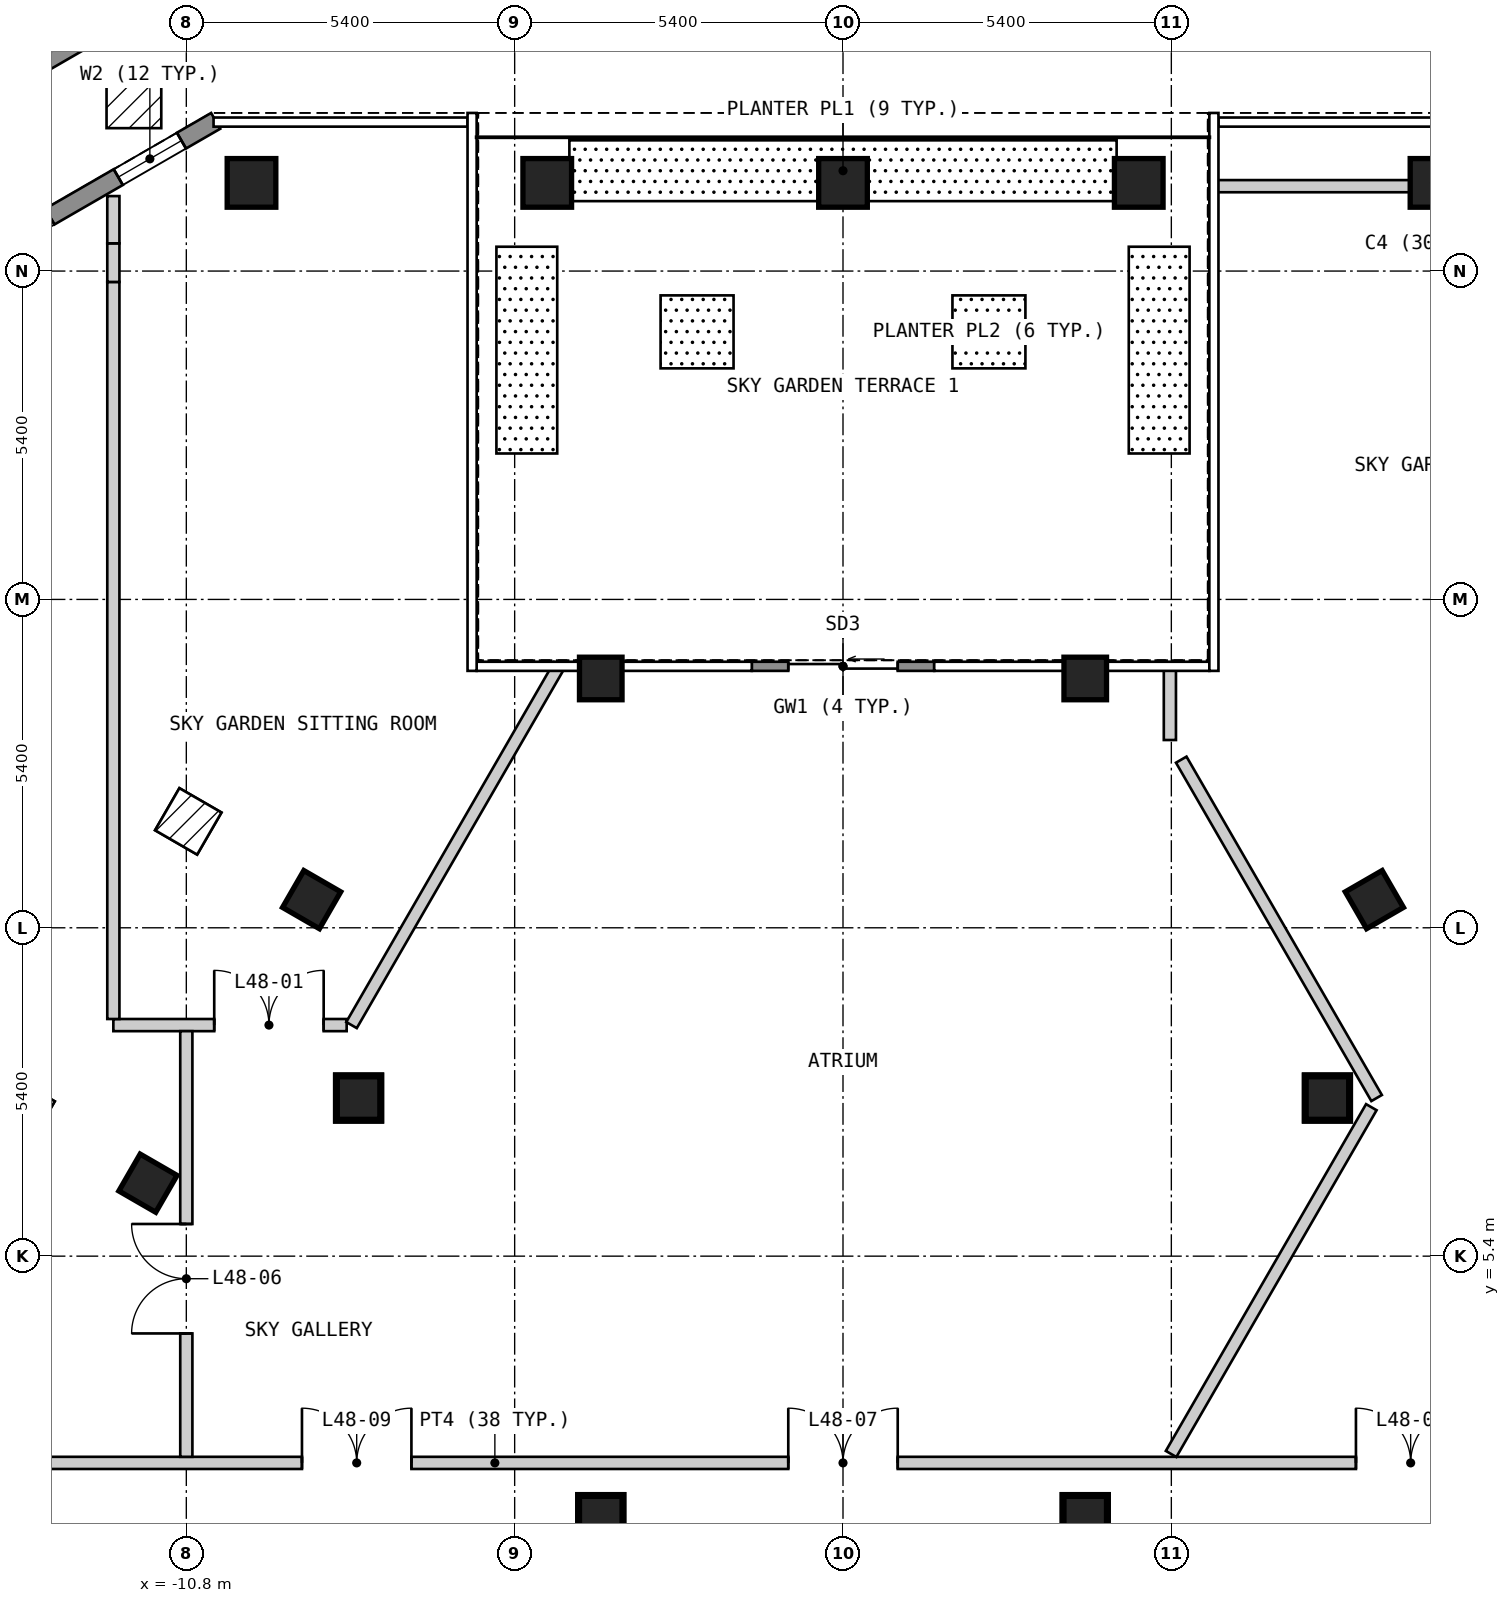
"""IFC4 building model, lengths in metres.
Left out: names, types, materials, properties, quantities, classifications, styles, units other than length and angle.
Written with IfcOpenShell. Run it as: python <this file> out.ifc"""

import sys

from ifc_helpers import new_model, si_unit, direction, frame, frame_2d, origin, origin_2d, place, context, subcontext, project, spatial, polyline, rectangle, outline, extrude, element, fill, save


model = new_model("IFC4")
c1 = context("Model", 3, precision=1e-05, world=origin(), true_north=direction((0.0, 1.0)))
c2 = subcontext(c1, "Body", "Model", "MODEL_VIEW")
j1 = project(units=[si_unit("LENGTHUNIT", "METRE"), si_unit("PLANEANGLEUNIT", "RADIAN")], contexts=[c1])
p1 = place(None, origin())
s1 = spatial("IfcSite", under=j1, at=p1, CompositionType="ELEMENT")
p2 = place(p1, origin())
s2 = spatial("IfcBuilding", under=s1, at=p2, CompositionType="ELEMENT")
p3 = place(p2, frame((0.0, 0.0, 157.2)))
s3 = spatial("IfcBuildingStorey", under=s2, at=p3, CompositionType="ELEMENT", Elevation=157.2)
for number, where, z_axis, x_axis in (
    (1, (9.728, 23.05, 0.0), (0.0, 0.0, 1.0), (-1.0, 0.0, 0.0)),
    (2, (4.864, 23.05, 0.0), (0.0, 0.0, 1.0), (-1.0, 0.0, 0.0)),
    (3, (0.0, 23.05, 0.0), (0.0, 0.0, 1.0), (-1.0, 0.0, 0.0)),
    (4, (-4.864, 23.05, 0.0), (0.0, 0.0, 1.0), (-1.0, 0.0, 0.0)),
    (5, (-9.728, 23.05, 0.0), (0.0, 0.0, 1.0), (-1.0, 0.0, 0.0)),
):
    element("IfcColumn", number, at=place(p3, frame(where, z_axis=z_axis, x_axis=x_axis)), inside=s3, PredefinedType="COLUMN", context=c2, shape_type="SweptSolid", body=[
        extrude(rectangle(XDim=0.8, YDim=0.8, at=origin_2d()), origin(), (0.0, 0.0, 1.0), 6.0),
    ])
for number, where, z_axis, x_axis in (
    (6, (3.984, 1.1, 0.0), (0.0, 0.0, 1.0), (1.0, 0.0, 0.0)),
    (7, (7.967, 8.0, 0.0), (0.0, 0.0, 1.0), (1.0, 0.0, 0.0)),
    (8, (8.739, 11.263, 0.0), (0.0, 0.0, 1.0), (-0.5, 0.866, 0.0)),
    (9, (3.984, 14.9, 0.0), (0.0, 0.0, 1.0), (1.0, 0.0, 0.0)),
    (10, (-3.984, 14.9, 0.0), (0.0, 0.0, 1.0), (1.0, 0.0, 0.0)),
    (11, (-8.739, 11.263, 0.0), (0.0, 0.0, 1.0), (-0.5, -0.866, 0.0)),
    (12, (-7.967, 8.0, 0.0), (0.0, 0.0, 1.0), (1.0, 0.0, 0.0)),
    (13, (-11.431, 6.6, 0.0), (0.0, 0.0, 1.0), (-0.5, -0.866, 0.0)),
    (14, (-3.984, 1.1, 0.0), (0.0, 0.0, 1.0), (1.0, 0.0, 0.0)),
):
    element("IfcColumn", number, at=place(p3, frame(where, z_axis=z_axis, x_axis=x_axis)), inside=s3, PredefinedType="COLUMN", context=c2, shape_type="SweptSolid", body=[
        extrude(rectangle(XDim=0.7, YDim=0.7, at=origin_2d()), origin(), (0.0, 0.0, 1.0), 6.0),
    ])
p4 = place(p3, frame((-10.317, 24.07, 0.0), z_axis=(0.0, 0.0, 1.0), x_axis=(-0.866022959057, -0.500004234368, 0.0)))
e15 = element("IfcWall", 15, at=p4, inside=s3, PredefinedType="SOLIDWALL", context=c2, shape_type="SweptSolid", body=[
    extrude(outline(polyline([(0.0, -0.15), (5.0, -0.15), (4.92, 0.15), (0.08, 0.15), (0.0, -0.15)])), origin(), (0.0, 0.0, 1.0), 5.7),
])
p5 = place(p4, frame((0.65, 0.0, 0.15)))
e16 = element("IfcOpeningElement", 16, at=p5, cuts=e15, PredefinedType="OPENING", context=c2, shape_type="SweptSolid", body=[
    extrude(rectangle(XDim=1.2, YDim=2.1, at=frame_2d((0.6, 1.05))), frame((0.0, 0.16, 0.0), z_axis=(0.0, -1.0, 0.0), x_axis=(1.0, 0.0, 0.0)), (0.0, 0.0, 1.0), 0.32),
])
p6 = place(p4, frame((3.149, 0.0, 0.15)))
e17 = element("IfcOpeningElement", 17, at=p6, cuts=e15, PredefinedType="OPENING", context=c2, shape_type="SweptSolid", body=[
    extrude(rectangle(XDim=1.2, YDim=2.1, at=frame_2d((0.6, 1.05))), frame((0.0, 0.16, 0.0), z_axis=(0.0, -1.0, 0.0), x_axis=(1.0, 0.0, 0.0)), (0.0, 0.0, 1.0), 0.32),
])
p7 = place(p3, frame((1.5, 15.1, 0.0), z_axis=(0.0, 0.0, 1.0), x_axis=(-1.0, 0.0, 0.0)))
e18 = element("IfcWall", 18, at=p7, inside=s3, PredefinedType="SOLIDWALL", context=c2, shape_type="SweptSolid", body=[
    extrude(rectangle(XDim=3.0, YDim=0.15, at=frame_2d((1.5, 0.0))), origin(), (0.0, 0.0, 1.0), 5.7),
])
p8 = place(p7, frame((0.6, 0.0, 0.0)))
e19 = element("IfcOpeningElement", 19, at=p8, cuts=e18, PredefinedType="OPENING", context=c2, shape_type="SweptSolid", body=[
    extrude(rectangle(XDim=1.8, YDim=2.4, at=frame_2d((0.9, 1.2))), frame((0.0, 0.085, 0.0), z_axis=(0.0, -1.0, 0.0), x_axis=(1.0, 0.0, 0.0)), (0.0, 0.0, 1.0), 0.17),
])
p9 = place(p3, frame((-16.622, 22.991, 0.0), z_axis=(0.0, 0.0, 1.0), x_axis=(0.865889515344, 0.500235291855, 0.0)))
e20 = element("IfcWall", 20, at=p9, inside=s3, PredefinedType="PARAPET", context=c2, shape_type="SweptSolid", body=[
    extrude(outline(polyline([(0.067, -0.125), (4.933, -0.125), (5.0, 0.125), (0.0, 0.125), (0.067, -0.125)])), origin(), (0.0, 0.0, 1.0), 1.6),
])
p10 = place(p3, frame((-24.451, 2.0, 0.0), z_axis=(0.0, 0.0, 1.0), x_axis=(1.0, 0.0, 0.0)))
e21 = element("IfcWall", 21, at=p10, inside=s3, PredefinedType="PARTITIONING", context=c2, shape_type="SweptSolid", body=[
    extrude(rectangle(XDim=37.451, YDim=0.2, at=frame_2d((18.726, 0.0))), origin(), (0.0, 0.0, 1.0), 5.7),
])
p11 = place(p10, frame((32.887, 0.0, 0.0)))
e22 = element("IfcOpeningElement", 22, at=p11, cuts=e21, PredefinedType="OPENING", context=c2, shape_type="SweptSolid", body=[
    extrude(rectangle(XDim=1.8, YDim=2.1, at=frame_2d((0.9, 1.05))), frame((0.0, 0.11, 0.0), z_axis=(0.0, -1.0, 0.0), x_axis=(1.0, 0.0, 0.0)), (0.0, 0.0, 1.0), 0.22),
])
p12 = place(p10, frame((23.551, 0.0, 0.0)))
e23 = element("IfcOpeningElement", 23, at=p12, cuts=e21, PredefinedType="OPENING", context=c2, shape_type="SweptSolid", body=[
    extrude(rectangle(XDim=1.8, YDim=2.1, at=frame_2d((0.9, 1.05))), frame((0.0, 0.11, 0.0), z_axis=(0.0, -1.0, 0.0), x_axis=(1.0, 0.0, 0.0)), (0.0, 0.0, 1.0), 0.22),
])
p13 = place(p10, frame((15.553, 0.0, 0.0)))
e24 = element("IfcOpeningElement", 24, at=p13, cuts=e21, PredefinedType="OPENING", context=c2, shape_type="SweptSolid", body=[
    extrude(rectangle(XDim=1.8, YDim=2.1, at=frame_2d((0.9, 1.05))), frame((0.0, 0.11, 0.0), z_axis=(0.0, -1.0, 0.0), x_axis=(1.0, 0.0, 0.0)), (0.0, 0.0, 1.0), 0.22),
])
p14 = place(p3, frame((-12.0, 9.2, 0.0), z_axis=(0.0, 0.0, 1.0), x_axis=(1.0, 0.0, 0.0)))
e25 = element("IfcWall", 25, at=p14, inside=s3, PredefinedType="PARTITIONING", context=c2, shape_type="SweptSolid", body=[
    extrude(rectangle(XDim=3.837, YDim=0.2, at=frame_2d((1.918, 0.0))), origin(), (0.0, 0.0, 1.0), 5.7),
])
p15 = place(p14, frame((1.659, 0.0, 0.0)))
e26 = element("IfcOpeningElement", 26, at=p15, cuts=e25, PredefinedType="OPENING", context=c2, shape_type="SweptSolid", body=[
    extrude(rectangle(XDim=1.8, YDim=2.1, at=frame_2d((0.9, 1.05))), frame((0.0, 0.11, 0.0), z_axis=(0.0, -1.0, 0.0), x_axis=(1.0, 0.0, 0.0)), (0.0, 0.0, 1.0), 0.22),
])
p16 = place(p3, frame((6.08, 22.996, 0.0), z_axis=(0.0, 0.0, 1.0), x_axis=(1.0, 0.0, 0.0)))
e27 = element("IfcWall", 27, at=p16, inside=s3, PredefinedType="PARTITIONING", context=c2, shape_type="SweptSolid", body=[
    extrude(rectangle(XDim=3.559, YDim=0.2, at=frame_2d((1.779, 0.0))), origin(), (0.0, 0.0, 1.0), 5.12),
])
p17 = place(p3, frame((9.639, 22.996, 0.0), z_axis=(0.0, 0.0, 1.0), x_axis=(1.0, 0.0, 0.0)))
e28 = element("IfcWall", 28, at=p17, inside=s3, PredefinedType="PARTITIONING", context=c2, shape_type="SweptSolid", body=[
    extrude(rectangle(XDim=0.089, YDim=0.2, at=frame_2d((0.044, 0.0))), origin(), (0.0, 0.0, 1.0), 5.12),
])
p18 = place(p3, frame((-12.0, 9.3, 0.0), z_axis=(0.0, 0.0, 1.0), x_axis=(0.0, 1.0, 0.0)))
e29 = element("IfcWall", 29, at=p18, inside=s3, PredefinedType="PARTITIONING", context=c2, shape_type="SweptSolid", body=[
    extrude(rectangle(XDim=12.121, YDim=0.2, at=frame_2d((6.061, 0.0))), origin(), (0.0, 0.0, 1.0), 5.7),
])
p19 = place(p3, frame((-12.0, 21.421, 0.0), z_axis=(0.0, 0.0, 1.0), x_axis=(0.0, 1.0, 0.0)))
e30 = element("IfcWall", 30, at=p19, inside=s3, PredefinedType="PARTITIONING", context=c2, shape_type="SweptSolid", body=[
    extrude(rectangle(XDim=0.635, YDim=0.2, at=frame_2d((0.317, 0.0))), origin(), (0.0, 0.0, 1.0), 5.12),
])
p20 = place(p3, frame((-12.0, 22.056, 0.0), z_axis=(0.0, 0.0, 1.0), x_axis=(0.0, 1.0, 0.0)))
e31 = element("IfcWall", 31, at=p20, inside=s3, PredefinedType="PARTITIONING", context=c2, shape_type="SweptSolid", body=[
    extrude(rectangle(XDim=0.777, YDim=0.2, at=frame_2d((0.389, 0.0))), origin(), (0.0, 0.0, 1.0), 5.7),
])
p21 = place(p3, frame((-10.8, 2.1, 0.0), z_axis=(0.0, 0.0, 1.0), x_axis=(0.0, 1.0, 0.0)))
e32 = element("IfcWall", 32, at=p21, inside=s3, PredefinedType="PARTITIONING", context=c2, shape_type="SweptSolid", body=[
    extrude(rectangle(XDim=7.0, YDim=0.2, at=frame_2d((3.5, 0.0))), origin(), (0.0, 0.0, 1.0), 5.7),
])
p22 = place(p21, frame((2.029, 0.0, 0.0)))
e33 = element("IfcOpeningElement", 33, at=p22, cuts=e32, PredefinedType="OPENING", context=c2, shape_type="SweptSolid", body=[
    extrude(rectangle(XDim=1.8, YDim=2.1, at=frame_2d((0.9, 1.05))), frame((0.0, 0.11, 0.0), z_axis=(0.0, -1.0, 0.0), x_axis=(1.0, 0.0, 0.0)), (0.0, 0.0, 1.0), 0.22),
])
p23 = place(p3, frame((5.376, 13.888, 0.0), z_axis=(0.0, 0.0, 1.0), x_axis=(0.0, 1.0, 0.0)))
e34 = element("IfcWall", 34, at=p23, inside=s3, PredefinedType="PARTITIONING", context=c2, shape_type="SweptSolid", body=[
    extrude(rectangle(XDim=1.232, YDim=0.2, at=frame_2d((0.616, 0.0))), origin(), (0.0, 0.0, 1.0), 5.7),
])
p24 = place(p3, frame((5.563, 13.565, 0.0), z_axis=(0.0, 0.0, 1.0), x_axis=(0.499996522553, -0.86602741148, 0.0)))
e35 = element("IfcWall", 35, at=p24, inside=s3, PredefinedType="PARTITIONING", context=c2, shape_type="SweptSolid", body=[
    extrude(rectangle(XDim=6.426, YDim=0.2, at=frame_2d((3.213, 0.0))), origin(), (0.0, 0.0, 1.0), 5.7),
])
p25 = place(p3, frame((5.396, 2.147, 0.0), z_axis=(0.0, 0.0, 1.0), x_axis=(0.500030520673, 0.866007781949, 0.0)))
e36 = element("IfcWall", 36, at=p25, inside=s3, PredefinedType="PARTITIONING", context=c2, shape_type="SweptSolid", body=[
    extrude(rectangle(XDim=6.585, YDim=0.2, at=frame_2d((3.293, 0.0))), origin(), (0.0, 0.0, 1.0), 5.7),
])
p26 = place(p3, frame((-8.083, 9.2, 0.0), z_axis=(0.0, 0.0, 1.0), x_axis=(0.499995535455, 0.866027981375, 0.0)))
e37 = element("IfcWall", 37, at=p26, inside=s3, PredefinedType="PARTITIONING", context=c2, shape_type="SweptSolid", body=[
    extrude(rectangle(XDim=6.836, YDim=0.2, at=frame_2d((3.418, 0.0))), origin(), (0.0, 0.0, 1.0), 5.7),
])
p27 = place(p5, origin())
e38 = element("IfcWindow", 38, at=p27, inside=s3, PartitioningType="SINGLE_PANEL", PredefinedType="WINDOW", context=c2, shape_type="SweptSolid", body=[
    extrude(rectangle(XDim=1.2, YDim=2.1, at=frame_2d((0.6, 1.05))), frame((0.0, 0.03, 0.0), z_axis=(0.0, -1.0, 0.0), x_axis=(1.0, 0.0, 0.0)), (0.0, 0.0, 1.0), 0.06),
])
fill(e16, e38)
p28 = place(p8, origin())
e39 = element("IfcDoor", 39, at=p28, inside=s3, OperationType="SLIDING_TO_LEFT", PredefinedType="DOOR", context=c2, shape_type="SweptSolid", body=[
    extrude(rectangle(XDim=1.8, YDim=2.4, at=frame_2d((0.9, 1.2))), frame((0.0, 0.025, 0.0), z_axis=(0.0, -1.0, 0.0), x_axis=(1.0, 0.0, 0.0)), (0.0, 0.0, 1.0), 0.05),
])
fill(e19, e39)
p29 = place(p15, origin())
e40 = element("IfcDoor", 40, at=p29, inside=s3, OperationType="DOUBLE_DOOR_SINGLE_SWING", PredefinedType="DOOR", context=c2, shape_type="SweptSolid", body=[
    extrude(rectangle(XDim=1.8, YDim=2.1, at=frame_2d((0.9, 1.05))), frame((0.0, 0.025, 0.0), z_axis=(0.0, -1.0, 0.0), x_axis=(1.0, 0.0, 0.0)), (0.0, 0.0, 1.0), 0.05),
])
fill(e26, e40)
p30 = place(p11, origin())
e41 = element("IfcDoor", 41, at=p30, inside=s3, OperationType="DOUBLE_DOOR_SINGLE_SWING", PredefinedType="DOOR", context=c2, shape_type="SweptSolid", body=[
    extrude(rectangle(XDim=1.8, YDim=2.1, at=frame_2d((0.9, 1.05))), frame((0.0, 0.025, 0.0), z_axis=(0.0, -1.0, 0.0), x_axis=(1.0, 0.0, 0.0)), (0.0, 0.0, 1.0), 0.05),
])
fill(e22, e41)
p31 = place(p22, origin())
e42 = element("IfcDoor", 42, at=p31, inside=s3, OperationType="DOUBLE_DOOR_SINGLE_SWING", PredefinedType="DOOR", context=c2, shape_type="SweptSolid", body=[
    extrude(rectangle(XDim=1.8, YDim=2.1, at=frame_2d((0.9, 1.05))), frame((0.0, 0.025, 0.0), z_axis=(0.0, -1.0, 0.0), x_axis=(1.0, 0.0, 0.0)), (0.0, 0.0, 1.0), 0.05),
])
fill(e33, e42)
p32 = place(p12, origin())
e43 = element("IfcDoor", 43, at=p32, inside=s3, OperationType="DOUBLE_DOOR_SINGLE_SWING", PredefinedType="DOOR", context=c2, shape_type="SweptSolid", body=[
    extrude(rectangle(XDim=1.8, YDim=2.1, at=frame_2d((0.9, 1.05))), frame((0.0, 0.025, 0.0), z_axis=(0.0, -1.0, 0.0), x_axis=(1.0, 0.0, 0.0)), (0.0, 0.0, 1.0), 0.05),
])
fill(e23, e43)
p33 = place(p13, origin())
e44 = element("IfcDoor", 44, at=p33, inside=s3, OperationType="DOUBLE_DOOR_SINGLE_SWING", PredefinedType="DOOR", context=c2, shape_type="SweptSolid", body=[
    extrude(rectangle(XDim=1.8, YDim=2.1, at=frame_2d((0.9, 1.05))), frame((0.0, 0.025, 0.0), z_axis=(0.0, -1.0, 0.0), x_axis=(1.0, 0.0, 0.0)), (0.0, 0.0, 1.0), 0.05),
])
fill(e24, e44)
save(model, sys.argv[1])
